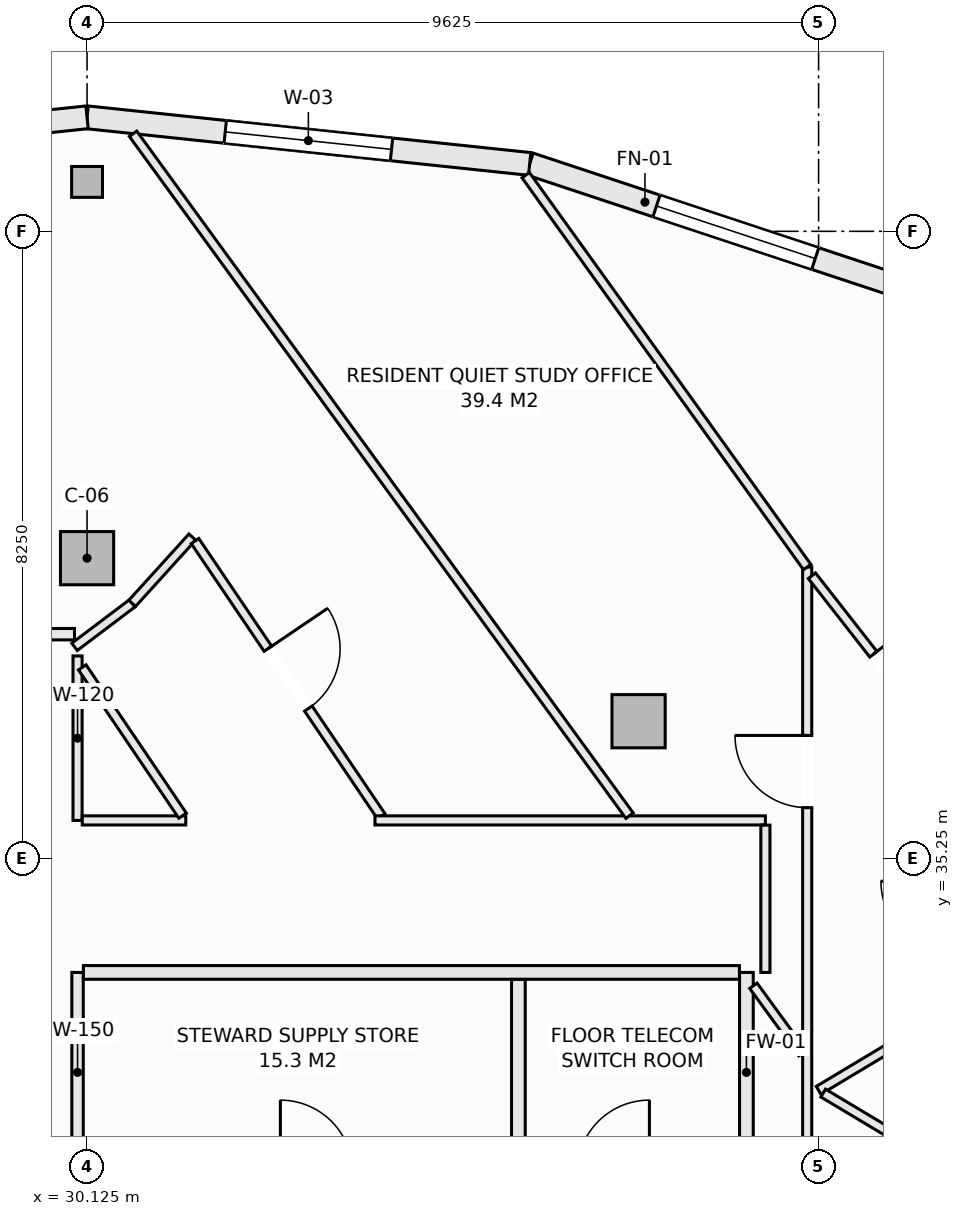
"""IFC4 building model, lengths in metres.
Left out: names, types, materials, properties, quantities, classifications, styles, units other than length and angle.
Written with IfcOpenShell. Run it as: python <this file> out.ifc"""

import sys

from ifc_helpers import new_model, si_unit, direction, frame, frame_2d, origin, origin_2d, place, context, subcontext, project, spatial, rectangle, hollow_rectangle, extrude, element, fill, save


model = new_model("IFC4")
c1 = context("Model", 3, precision=1e-05, world=origin(), true_north=direction((0.0, 1.0)))
c2 = subcontext(c1, "Body", "Model", "MODEL_VIEW")
j1 = project(units=[si_unit("LENGTHUNIT", "METRE"), si_unit("PLANEANGLEUNIT", "RADIAN")], contexts=[c1])
p1 = place(None, origin())
s1 = spatial("IfcSite", under=j1, at=p1, CompositionType="ELEMENT")
p2 = place(p1, origin())
s2 = spatial("IfcBuilding", under=s1, at=p2, CompositionType="ELEMENT")
p3 = place(p2, frame((0.0, 0.0, 242.6)))
s3 = spatial("IfcBuildingStorey", under=s2, at=p3, CompositionType="ELEMENT", Elevation=242.6)
p4 = place(p3, frame((30.125, 44.15, -0.27), z_axis=(0.0, 0.0, 1.0), x_axis=(1.0, 0.0, 0.0)))
e1 = element("IfcColumn", 1, at=p4, inside=s3, PredefinedType="COLUMN", context=c2, shape_type="SweptSolid", body=[
    extrude(hollow_rectangle(XDim=0.406, YDim=0.406, WallThickness=0.016, at=origin_2d()), origin(), (0.0, 0.0, 1.0), 3.3),
])
for number, where, z_axis, x_axis in (
    (2, (37.382, 37.055, -0.27), (0.0, 0.0, 1.0), (1.0, 0.0, 0.0)),
    (3, (30.125, 39.2, -0.27), (0.0, 0.0, 1.0), (1.0, 0.0, 0.0)),
):
    element("IfcColumn", number, at=place(p3, frame(where, z_axis=z_axis, x_axis=x_axis)), inside=s3, PredefinedType="COLUMN", context=c2, shape_type="SweptSolid", body=[
        extrude(rectangle(XDim=0.7, YDim=0.7, at=origin_2d()), origin(), (0.0, 0.0, 1.0), 3.3),
    ])
p5 = place(p3, frame((35.948, 44.387, 0.0), z_axis=(0.0, 0.0, 1.0), x_axis=(0.949232769585, -0.314574552605, 0.0)))
e4 = element("IfcWall", 4, at=p5, inside=s3, PredefinedType="SOLIDWALL", context=c2, shape_type="SweptSolid", body=[
    extrude(rectangle(XDim=5.717, YDim=0.3, at=frame_2d((2.858, 0.0))), origin(), (0.0, 0.0, 1.0), 2.605),
])
p6 = place(p5, frame((1.758, 0.0, 0.72)))
e5 = element("IfcOpeningElement", 5, at=p6, cuts=e4, PredefinedType="OPENING", context=c2, shape_type="SweptSolid", body=[
    extrude(rectangle(XDim=2.2, YDim=1.65, at=frame_2d((1.1, 0.825))), frame((0.0, 0.16, 0.0), z_axis=(0.0, -1.0, 0.0), x_axis=(1.0, 0.0, 0.0)), (0.0, 0.0, 1.0), 0.32),
])
p7 = place(p3, frame((30.125, 45.0, 0.0), z_axis=(0.0, 0.0, 1.0), x_axis=(0.994500425783, -0.10473253132, 0.0)))
e6 = element("IfcWall", 6, at=p7, inside=s3, PredefinedType="SOLIDWALL", context=c2, shape_type="SweptSolid", body=[
    extrude(rectangle(XDim=5.856, YDim=0.3, at=frame_2d((2.928, 0.0))), origin(), (0.0, 0.0, 1.0), 2.605),
])
p8 = place(p7, frame((1.828, 0.0, 0.72)))
e7 = element("IfcOpeningElement", 7, at=p8, cuts=e6, PredefinedType="OPENING", context=c2, shape_type="SweptSolid", body=[
    extrude(rectangle(XDim=2.2, YDim=1.65, at=frame_2d((1.1, 0.825))), frame((0.0, 0.16, 0.0), z_axis=(0.0, -1.0, 0.0), x_axis=(1.0, 0.0, 0.0)), (0.0, 0.0, 1.0), 0.32),
])
p9 = place(p3, frame((24.302, 44.387, 0.0), z_axis=(0.0, 0.0, 1.0), x_axis=(0.994500425783, 0.10473253132, 0.0)))
e8 = element("IfcWall", 8, at=p9, inside=s3, PredefinedType="SOLIDWALL", context=c2, shape_type="SweptSolid", body=[
    extrude(rectangle(XDim=5.856, YDim=0.3, at=frame_2d((2.928, 0.0))), origin(), (0.0, 0.0, 1.0), 2.605),
])
p10 = place(p9, frame((1.828, 0.0, 0.72)))
e9 = element("IfcOpeningElement", 9, at=p10, cuts=e8, PredefinedType="OPENING", context=c2, shape_type="SweptSolid", body=[
    extrude(rectangle(XDim=2.2, YDim=1.65, at=frame_2d((1.1, 0.825))), frame((0.0, 0.16, 0.0), z_axis=(0.0, -1.0, 0.0), x_axis=(1.0, 0.0, 0.0)), (0.0, 0.0, 1.0), 0.32),
])
p11 = place(p3, frame((30.0, 31.12, 0.0), z_axis=(0.0, 0.0, 1.0), x_axis=(0.0, 1.0, 0.0)))
e10 = element("IfcWall", 10, at=p11, inside=s3, PredefinedType="PARTITIONING", context=c2, shape_type="SweptSolid", body=[
    extrude(rectangle(XDim=2.63, YDim=0.15, at=frame_2d((1.315, 0.0))), origin(), (0.0, 0.0, 1.0), 3.03),
])
p12 = place(p3, frame((30.0, 35.75, 0.0), z_axis=(0.0, 0.0, 1.0), x_axis=(0.0, 1.0, 0.0)))
e11 = element("IfcWall", 11, at=p12, inside=s3, PredefinedType="PARTITIONING", context=c2, shape_type="SweptSolid", body=[
    extrude(rectangle(XDim=2.164, YDim=0.12, at=frame_2d((1.082, 0.0))), origin(), (0.0, 0.0, 1.0), 3.03),
])
p13 = place(p3, frame((38.8, 31.12, 0.0), z_axis=(0.0, 0.0, 1.0), x_axis=(0.0, 1.0, 0.0)))
e12 = element("IfcWall", 12, at=p13, inside=s3, PredefinedType="SOLIDWALL", context=c2, shape_type="SweptSolid", body=[
    extrude(rectangle(XDim=2.63, YDim=0.18, at=frame_2d((1.315, 0.0))), origin(), (0.0, 0.0, 1.0), 3.03),
])
p14 = place(p3, frame((30.077, 33.75, 0.0), z_axis=(0.0, 0.0, 1.0), x_axis=(1.0, 0.0, 0.0)))
e13 = element("IfcWall", 13, at=p14, inside=s3, PredefinedType="SOLIDWALL", context=c2, shape_type="SweptSolid", body=[
    extrude(rectangle(XDim=8.631, YDim=0.18, at=frame_2d((4.315, 0.0))), origin(), (0.0, 0.0, 1.0), 3.03),
])
p15 = place(p3, frame((35.8, 31.212, 0.0), z_axis=(0.0, 0.0, 1.0), x_axis=(0.0, 1.0, 0.0)))
e14 = element("IfcWall", 14, at=p15, inside=s3, PredefinedType="SOLIDWALL", context=c2, shape_type="SweptSolid", body=[
    extrude(rectangle(XDim=2.446, YDim=0.18, at=frame_2d((1.223, 0.0))), origin(), (0.0, 0.0, 1.0), 3.03),
])
p16 = place(p3, frame((27.227, 38.2, 0.0), z_axis=(0.0, 0.0, 1.0), x_axis=(1.0, 0.0, 0.0)))
e15 = element("IfcWall", 15, at=p16, inside=s3, PredefinedType="PARTITIONING", context=c2, shape_type="SweptSolid", body=[
    extrude(rectangle(XDim=2.733, YDim=0.15, at=frame_2d((1.366, 0.0))), origin(), (0.0, 0.0, 1.0), 3.03),
])
p17 = place(p3, frame((29.96, 38.033, 0.0), z_axis=(0.0, 0.0, 1.0), x_axis=(0.79811694623, 0.602502564426, 0.0)))
e16 = element("IfcWall", 16, at=p17, inside=s3, PredefinedType="PARTITIONING", context=c2, shape_type="SweptSolid", body=[
    extrude(rectangle(XDim=0.951, YDim=0.12, at=frame_2d((0.476, 0.0))), origin(), (0.0, 0.0, 1.0), 3.03),
])
p18 = place(p3, frame((30.719, 38.606, 0.0), z_axis=(0.0, 0.0, 1.0), x_axis=(0.671846687959, 0.740690237466, 0.0)))
e17 = element("IfcWall", 17, at=p18, inside=s3, PredefinedType="PARTITIONING", context=c2, shape_type="SweptSolid", body=[
    extrude(rectangle(XDim=1.177, YDim=0.12, at=frame_2d((0.589, 0.0))), origin(), (0.0, 0.0, 1.0), 3.03),
])
p19 = place(p3, frame((31.546, 39.425, 0.0), z_axis=(0.0, 0.0, 1.0), x_axis=(0.56035895857, -0.828249864202, 0.0)))
e18 = element("IfcWall", 18, at=p19, inside=s3, PredefinedType="PARTITIONING", context=c2, shape_type="SweptSolid", body=[
    extrude(rectangle(XDim=4.371, YDim=0.12, at=frame_2d((2.186, 0.0))), origin(), (0.0, 0.0, 1.0), 3.03),
])
p20 = place(p19, frame((1.71, 0.0, 0.0)))
e19 = element("IfcOpeningElement", 19, at=p20, cuts=e18, PredefinedType="OPENING", context=c2, shape_type="SweptSolid", body=[
    extrude(rectangle(XDim=0.95, YDim=2.1, at=frame_2d((0.475, 1.05))), frame((0.0, 0.07, 0.0), z_axis=(0.0, -1.0, 0.0), x_axis=(1.0, 0.0, 0.0)), (0.0, 0.0, 1.0), 0.14),
])
p21 = place(p3, frame((30.062, 35.75, 0.0), z_axis=(0.0, 0.0, 1.0), x_axis=(1.0, 0.0, 0.0)))
e20 = element("IfcWall", 20, at=p21, inside=s3, PredefinedType="PARTITIONING", context=c2, shape_type="SweptSolid", body=[
    extrude(rectangle(XDim=1.362, YDim=0.12, at=frame_2d((0.681, 0.0))), origin(), (0.0, 0.0, 1.0), 3.03),
])
p22 = place(p3, frame((33.913, 35.75, 0.0), z_axis=(0.0, 0.0, 1.0), x_axis=(1.0, 0.0, 0.0)))
e21 = element("IfcWall", 21, at=p22, inside=s3, PredefinedType="PARTITIONING", context=c2, shape_type="SweptSolid", body=[
    extrude(rectangle(XDim=5.137, YDim=0.12, at=frame_2d((2.568, 0.0))), origin(), (0.0, 0.0, 1.0), 2.478),
])
p23 = place(p3, frame((39.05, 33.75, 0.0), z_axis=(0.0, 0.0, 1.0), x_axis=(0.0, 1.0, 0.0)))
e22 = element("IfcWall", 22, at=p23, inside=s3, PredefinedType="PARTITIONING", context=c2, shape_type="SweptSolid", body=[
    extrude(rectangle(XDim=1.938, YDim=0.12, at=frame_2d((0.969, 0.0))), origin(), (0.0, 0.0, 1.0), 3.03),
])
p24 = place(p3, frame((39.6, 31.212, 0.0), z_axis=(0.0, 0.0, 1.0), x_axis=(0.0, 1.0, 0.0)))
e23 = element("IfcWall", 23, at=p24, inside=s3, PredefinedType="PARTITIONING", context=c2, shape_type="SweptSolid", body=[
    extrude(rectangle(XDim=7.871, YDim=0.12, at=frame_2d((3.936, 0.0))), origin(), (0.0, 0.0, 1.0), 3.03),
])
p25 = place(p24, frame((4.706, 0.0, 0.0)))
e24 = element("IfcOpeningElement", 24, at=p25, cuts=e23, PredefinedType="OPENING", context=c2, shape_type="SweptSolid", body=[
    extrude(rectangle(XDim=0.95, YDim=2.1, at=frame_2d((0.475, 1.05))), frame((0.0, 0.07, 0.0), z_axis=(0.0, -1.0, 0.0), x_axis=(1.0, 0.0, 0.0)), (0.0, 0.0, 1.0), 0.14),
])
p26 = place(p3, frame((39.662, 38.969, 0.0), z_axis=(0.0, 0.0, 1.0), x_axis=(0.616500468458, -0.787354540465, 0.0)))
e25 = element("IfcWall", 25, at=p26, inside=s3, PredefinedType="PARTITIONING", context=c2, shape_type="SweptSolid", body=[
    extrude(rectangle(XDim=3.014, YDim=0.12, at=frame_2d((1.507, 0.0))), origin(), (0.0, 0.0, 1.0), 3.03),
])
p27 = place(p26, frame((1.312, 0.0, 0.0)))
e26 = element("IfcOpeningElement", 26, at=p27, cuts=e25, PredefinedType="OPENING", context=c2, shape_type="SweptSolid", body=[
    extrude(rectangle(XDim=0.95, YDim=2.1, at=frame_2d((0.475, 1.05))), frame((0.0, 0.07, 0.0), z_axis=(0.0, -1.0, 0.0), x_axis=(1.0, 0.0, 0.0)), (0.0, 0.0, 1.0), 0.14),
])
p28 = place(p3, frame((39.75, 32.199, 0.0), z_axis=(0.0, 0.0, 1.0), x_axis=(0.857702120906, 0.514146935996, 0.0)))
e27 = element("IfcWall", 27, at=p28, inside=s3, PredefinedType="PARTITIONING", context=c2, shape_type="SweptSolid", body=[
    extrude(rectangle(XDim=1.441, YDim=0.12, at=frame_2d((0.721, 0.0))), origin(), (0.0, 0.0, 1.0), 3.03),
])
p29 = place(p3, frame((39.81, 32.163, 0.0), z_axis=(0.0, 0.0, 1.0), x_axis=(0.858011245414, -0.513630901273, 0.0)))
e28 = element("IfcWall", 28, at=p29, inside=s3, PredefinedType="PARTITIONING", context=c2, shape_type="SweptSolid", body=[
    extrude(rectangle(XDim=1.37, YDim=0.12, at=frame_2d((0.685, 0.0))), origin(), (0.0, 0.0, 1.0), 3.03),
])
p30 = place(p3, frame((30.062, 37.763, 0.0), z_axis=(0.0, 0.0, 1.0), x_axis=(0.560355372245, -0.828252290547, 0.0)))
e29 = element("IfcWall", 29, at=p30, inside=s3, PredefinedType="PARTITIONING", context=c2, shape_type="SweptSolid", body=[
    extrude(rectangle(XDim=2.356, YDim=0.12, at=frame_2d((1.178, 0.0))), origin(), (0.0, 0.0, 1.0), 3.03),
])
p31 = place(p3, frame((30.73, 44.783, 0.0), z_axis=(0.0, 0.0, 1.0), x_axis=(0.588659483045, -0.808381106299, 0.0)))
e30 = element("IfcWall", 30, at=p31, inside=s3, PredefinedType="PARTITIONING", context=c2, shape_type="SweptSolid", body=[
    extrude(rectangle(XDim=11.098, YDim=0.12, at=frame_2d((5.549, 0.0))), origin(), (0.0, 0.0, 1.0), 2.478),
])
p32 = place(p3, frame((38.892, 33.575, 0.0), z_axis=(0.0, 0.0, 1.0), x_axis=(0.5886213307, -0.808408887287, 0.0)))
e31 = element("IfcWall", 31, at=p32, inside=s3, PredefinedType="PARTITIONING", context=c2, shape_type="SweptSolid", body=[
    extrude(rectangle(XDim=1.097, YDim=0.12, at=frame_2d((0.549, 0.0))), origin(), (0.0, 0.0, 1.0), 3.03),
])
p33 = place(p3, frame((35.896, 44.24, 0.0), z_axis=(0.0, 0.0, 1.0), x_axis=(0.583414962814, -0.812174230793, 0.0)))
e32 = element("IfcWall", 32, at=p33, inside=s3, PredefinedType="PARTITIONING", context=c2, shape_type="SweptSolid", body=[
    extrude(rectangle(XDim=6.349, YDim=0.12, at=frame_2d((3.175, 0.0))), origin(), (0.0, 0.0, 1.0), 3.03),
])
p34 = place(p6, origin())
e33 = element("IfcWindow", 33, at=p34, inside=s3, PartitioningType="SINGLE_PANEL", PredefinedType="WINDOW", context=c2, shape_type="SweptSolid", body=[
    extrude(rectangle(XDim=2.2, YDim=1.65, at=frame_2d((1.1, 0.825))), frame((0.0, 0.03, 0.0), z_axis=(0.0, -1.0, 0.0), x_axis=(1.0, 0.0, 0.0)), (0.0, 0.0, 1.0), 0.06),
])
fill(e5, e33)
p35 = place(p8, origin())
e34 = element("IfcWindow", 34, at=p35, inside=s3, PartitioningType="SINGLE_PANEL", PredefinedType="WINDOW", context=c2, shape_type="SweptSolid", body=[
    extrude(rectangle(XDim=2.2, YDim=1.65, at=frame_2d((1.1, 0.825))), frame((0.0, 0.03, 0.0), z_axis=(0.0, -1.0, 0.0), x_axis=(1.0, 0.0, 0.0)), (0.0, 0.0, 1.0), 0.06),
])
fill(e7, e34)
p36 = place(p27, origin())
e35 = element("IfcDoor", 35, at=p36, inside=s3, OperationType="SINGLE_SWING_LEFT", PredefinedType="DOOR", context=c2, shape_type="SweptSolid", body=[
    extrude(rectangle(XDim=0.95, YDim=2.1, at=frame_2d((0.475, 1.05))), frame((0.0, 0.025, 0.0), z_axis=(0.0, -1.0, 0.0), x_axis=(1.0, 0.0, 0.0)), (0.0, 0.0, 1.0), 0.05),
])
fill(e26, e35)
p37 = place(p25, origin())
e36 = element("IfcDoor", 36, at=p37, inside=s3, OperationType="SINGLE_SWING_RIGHT", PredefinedType="DOOR", context=c2, shape_type="SweptSolid", body=[
    extrude(rectangle(XDim=0.95, YDim=2.1, at=frame_2d((0.475, 1.05))), frame((0.0, 0.025, 0.0), z_axis=(0.0, -1.0, 0.0), x_axis=(1.0, 0.0, 0.0)), (0.0, 0.0, 1.0), 0.05),
])
fill(e24, e36)
p38 = place(p20, origin())
e37 = element("IfcDoor", 37, at=p38, inside=s3, OperationType="SINGLE_SWING_LEFT", PredefinedType="DOOR", context=c2, shape_type="SweptSolid", body=[
    extrude(rectangle(XDim=0.95, YDim=2.1, at=frame_2d((0.475, 1.05))), frame((0.0, 0.025, 0.0), z_axis=(0.0, -1.0, 0.0), x_axis=(1.0, 0.0, 0.0)), (0.0, 0.0, 1.0), 0.05),
])
fill(e19, e37)
save(model, sys.argv[1])
